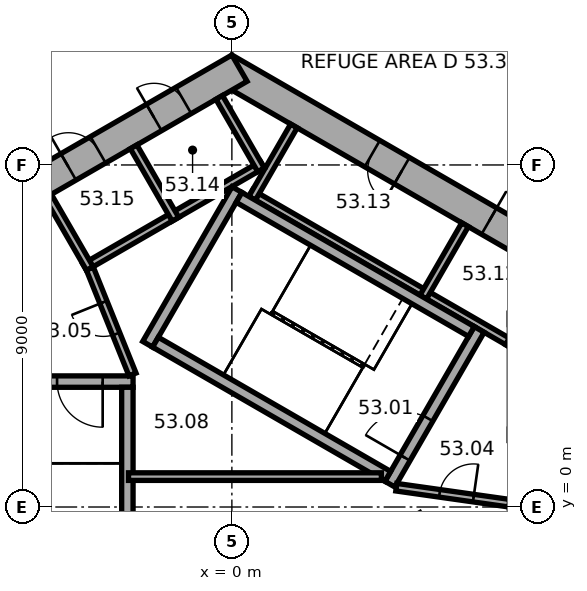
"""IFC4 building model, lengths in metres.
Left out: names, types, materials, properties, quantities, classifications, styles, units other than length and angle.
Written with IfcOpenShell. Run it as: python <this file> out.ifc"""

import sys

from ifc_helpers import new_model, si_unit, direction, frame, frame_2d, origin, place, context, subcontext, project, spatial, rectangle, extrude, element, fill, save


model = new_model("IFC4")
c1 = context("Model", 3, precision=1e-05, world=origin(), true_north=direction((0.0, 1.0)))
c2 = subcontext(c1, "Body", "Model", "MODEL_VIEW")
j1 = project(units=[si_unit("LENGTHUNIT", "METRE"), si_unit("PLANEANGLEUNIT", "RADIAN")], contexts=[c1])
p1 = place(None, origin())
s1 = spatial("IfcSite", under=j1, at=p1, CompositionType="ELEMENT")
p2 = place(p1, origin())
s2 = spatial("IfcBuilding", under=s1, at=p2, CompositionType="ELEMENT")
p3 = place(p2, frame((0.0, 0.0, 214.3)))
s3 = spatial("IfcBuildingStorey", under=s2, at=p3, CompositionType="ELEMENT", Elevation=214.3)
p4 = place(p3, frame((10.1, 5.6, 0.0), z_axis=(0.0, 0.0, 1.0), x_axis=(-0.866023897231, 0.500002609418, 0.0)))
e1 = element("IfcWall", 1, at=p4, inside=s3, PredefinedType="SHEAR", context=c2, shape_type="SweptSolid", body=[
    extrude(rectangle(XDim=11.894, YDim=0.8, at=frame_2d((5.947, 0.0))), origin(), (0.0, 0.0, 1.0), 7.4),
])
p5 = place(p4, frame((2.947, 0.0, 0.0)))
e2 = element("IfcOpeningElement", 2, at=p5, cuts=e1, PredefinedType="OPENING", context=c2, shape_type="SweptSolid", body=[
    extrude(rectangle(XDim=0.9, YDim=2.1, at=frame_2d((0.45, 1.05))), frame((0.0, 0.41, 0.0), z_axis=(0.0, -1.0, 0.0), x_axis=(1.0, 0.0, 0.0)), (0.0, 0.0, 1.0), 0.82),
])
p6 = place(p4, frame((6.497, 0.0, 0.0)))
e3 = element("IfcOpeningElement", 3, at=p6, cuts=e1, PredefinedType="OPENING", context=c2, shape_type="SweptSolid", body=[
    extrude(rectangle(XDim=0.9, YDim=2.1, at=frame_2d((0.45, 1.05))), frame((0.0, 0.41, 0.0), z_axis=(0.0, -1.0, 0.0), x_axis=(1.0, 0.0, 0.0)), (0.0, 0.0, 1.0), 0.82),
])
p7 = place(p3, frame((0.2, 11.547, 0.0), z_axis=(0.0, 0.0, 1.0), x_axis=(-0.866023897231, -0.500002609418, 0.0)))
e4 = element("IfcWall", 4, at=p7, inside=s3, PredefinedType="SHEAR", context=c2, shape_type="SweptSolid", body=[
    extrude(rectangle(XDim=11.894, YDim=0.8, at=frame_2d((5.947, 0.0))), origin(), (0.0, 0.0, 1.0), 7.4),
])
p8 = place(p7, frame((6.147, 0.0, 0.0)))
e5 = element("IfcOpeningElement", 5, at=p8, cuts=e4, PredefinedType="OPENING", context=c2, shape_type="SweptSolid", body=[
    extrude(rectangle(XDim=1.5, YDim=2.1, at=frame_2d((0.75, 1.05))), frame((0.0, 0.41, 0.0), z_axis=(0.0, -1.0, 0.0), x_axis=(1.0, 0.0, 0.0)), (0.0, 0.0, 1.0), 0.82),
])
p9 = place(p7, frame((1.697, 0.0, 0.0)))
e6 = element("IfcOpeningElement", 6, at=p9, cuts=e4, PredefinedType="OPENING", context=c2, shape_type="SweptSolid", body=[
    extrude(rectangle(XDim=0.9, YDim=2.1, at=frame_2d((0.45, 1.05))), frame((0.0, 0.41, 0.0), z_axis=(0.0, -1.0, 0.0), x_axis=(1.0, 0.0, 0.0)), (0.0, 0.0, 1.0), 0.82),
])
p10 = place(p7, frame((4.297, 0.0, 0.0)))
e7 = element("IfcOpeningElement", 7, at=p10, cuts=e4, PredefinedType="OPENING", context=c2, shape_type="SweptSolid", body=[
    extrude(rectangle(XDim=0.9, YDim=2.1, at=frame_2d((0.45, 1.05))), frame((0.0, 0.41, 0.0), z_axis=(0.0, -1.0, 0.0), x_axis=(1.0, 0.0, 0.0)), (0.0, 0.0, 1.0), 0.82),
])
p11 = place(p3, frame((7.424, 4.259, 0.0), z_axis=(0.0, 0.0, 1.0), x_axis=(-0.866026010844, 0.49999894854, 0.0)))
e8 = element("IfcWall", 8, at=p11, inside=s3, PredefinedType="PARTITIONING", context=c2, shape_type="SweptSolid", body=[
    extrude(rectangle(XDim=8.0, YDim=0.2, at=frame_2d((4.0, 0.0))), origin(), (0.0, 0.0, 1.0), 7.12),
])
for number, where, z_axis, x_axis in (
    (9, (7.287, 4.222, 0.0), (0.0, 0.0, 1.0), (0.5, 0.866, 0.0)),
    (10, (5.036, 5.522, 0.0), (0.0, 0.0, 1.0), (0.5, 0.866, 0.0)),
    (11, (0.532, 8.122, 0.0), (0.0, 0.0, 1.0), (0.5, 0.866, 0.0)),
):
    element("IfcWall", number, at=place(p3, frame(where, z_axis=z_axis, x_axis=x_axis)), inside=s3, PredefinedType="PARTITIONING", context=c2, shape_type="SweptSolid", body=[
        extrude(rectangle(XDim=2.2, YDim=0.2, at=frame_2d((1.1, 0.0))), origin(), (0.0, 0.0, 1.0), 7.12),
    ])
p12 = place(p3, frame((0.803, 9.009, 0.0), z_axis=(0.0, 0.0, 1.0), x_axis=(-0.866028230842, -0.499995103361, 0.0)))
e12 = element("IfcWall", 12, at=p12, inside=s3, PredefinedType="PARTITIONING", context=c2, shape_type="SweptSolid", body=[
    extrude(rectangle(XDim=5.4, YDim=0.2, at=frame_2d((2.7, 0.0))), origin(), (0.0, 0.0, 1.0), 7.12),
])
p13 = place(p3, frame((0.767, 8.872, 0.0), z_axis=(0.0, 0.0, 1.0), x_axis=(-0.499994660107, 0.866028486751, 0.0)))
e13 = element("IfcWall", 13, at=p13, inside=s3, PredefinedType="PARTITIONING", context=c2, shape_type="SweptSolid", body=[
    extrude(rectangle(XDim=2.2, YDim=0.2, at=frame_2d((1.1, 0.0))), origin(), (0.0, 0.0, 1.0), 7.12),
])
for number, where, z_axis, x_axis in (
    (14, (-1.485, 7.572, 0.0), (0.0, 0.0, 1.0), (-0.5, 0.866, 0.0)),
    (15, (-3.737, 6.272, 0.0), (0.0, 0.0, 1.0), (-0.5, 0.866, 0.0)),
):
    element("IfcWall", number, at=place(p3, frame(where, z_axis=z_axis, x_axis=x_axis)), inside=s3, PredefinedType="PARTITIONING", context=c2, shape_type="SweptSolid", body=[
        extrude(rectangle(XDim=2.2, YDim=0.2, at=frame_2d((1.1, 0.0))), origin(), (0.0, 0.0, 1.0), 7.12),
    ])
p14 = place(p3, frame((4.158, 0.602, 0.0), z_axis=(0.0, 0.0, 1.0), x_axis=(0.499977259774, 0.866038532462, 0.0)))
e16 = element("IfcWall", 16, at=p14, inside=s3, PredefinedType="SHEAR", context=c2, shape_type="SweptSolid", body=[
    extrude(rectangle(XDim=4.7, YDim=0.3, at=frame_2d((2.35, 0.0))), origin(), (0.0, 0.0, 1.0), 7.12),
])
p15 = place(p14, frame((0.8, 0.0, 0.0)))
e17 = element("IfcOpeningElement", 17, at=p15, cuts=e16, PredefinedType="OPENING", context=c2, shape_type="SweptSolid", body=[
    extrude(rectangle(XDim=1.2, YDim=2.1, at=frame_2d((0.6, 1.05))), frame((0.0, 0.16, 0.0), z_axis=(0.0, -1.0, 0.0), x_axis=(1.0, 0.0, 0.0)), (0.0, 0.0, 1.0), 0.32),
])
p16 = place(p3, frame((-2.216, 4.282, 0.0), z_axis=(0.0, 0.0, 1.0), x_axis=(0.499977259774, 0.866038532462, 0.0)))
e18 = element("IfcWall", 18, at=p16, inside=s3, PredefinedType="SHEAR", context=c2, shape_type="SweptSolid", body=[
    extrude(rectangle(XDim=4.7, YDim=0.3, at=frame_2d((2.35, 0.0))), origin(), (0.0, 0.0, 1.0), 7.12),
])
for number, where, z_axis, x_axis in (
    (19, (4.103, 0.807, 0.0), (0.0, 0.0, 1.0), (-0.866, 0.5, 0.0)),
    (20, (6.303, 4.617, 0.0), (0.0, 0.0, 1.0), (-0.866, 0.5, 0.0)),
):
    element("IfcWall", number, at=place(p3, frame(where, z_axis=z_axis, x_axis=x_axis)), inside=s3, PredefinedType="SHEAR", context=c2, shape_type="SweptSolid", body=[
        extrude(rectangle(XDim=7.06, YDim=0.3, at=frame_2d((3.53, 0.0))), origin(), (0.0, 0.0, 1.0), 7.12),
    ])
p17 = place(p3, frame((-2.6, 3.3, 0.0), z_axis=(0.0, 0.0, 1.0), x_axis=(-1.0, 0.0, 0.0)))
e21 = element("IfcWall", 21, at=p17, inside=s3, PredefinedType="SHEAR", context=c2, shape_type="SweptSolid", body=[
    extrude(rectangle(XDim=4.7, YDim=0.3, at=frame_2d((2.35, 0.0))), origin(), (0.0, 0.0, 1.0), 7.12),
])
p18 = place(p17, frame((0.8, 0.0, 0.0)))
e22 = element("IfcOpeningElement", 22, at=p18, cuts=e21, PredefinedType="OPENING", context=c2, shape_type="SweptSolid", body=[
    extrude(rectangle(XDim=1.2, YDim=2.1, at=frame_2d((0.6, 1.05))), frame((0.0, 0.16, 0.0), z_axis=(0.0, -1.0, 0.0), x_axis=(1.0, 0.0, 0.0)), (0.0, 0.0, 1.0), 0.32),
])
p19 = place(p3, frame((-2.75, 3.15, 0.0), z_axis=(0.0, 0.0, 1.0), x_axis=(0.0, -1.0, 0.0)))
e23 = element("IfcWall", 23, at=p19, inside=s3, PredefinedType="SHEAR", context=c2, shape_type="SweptSolid", body=[
    extrude(rectangle(XDim=7.06, YDim=0.3, at=frame_2d((3.53, 0.0))), origin(), (0.0, 0.0, 1.0), 7.12),
])
p20 = place(p3, frame((4.327, 0.521, 0.0), z_axis=(0.0, 0.0, 1.0), x_axis=(0.990124376366, -0.14019172346, 0.0)))
e24 = element("IfcWall", 24, at=p20, inside=s3, PredefinedType="PARTITIONING", context=c2, shape_type="SweptSolid", body=[
    extrude(rectangle(XDim=3.002, YDim=0.2, at=frame_2d((1.501, 0.0))), origin(), (0.0, 0.0, 1.0), 7.12),
])
p21 = place(p20, frame((1.15, 0.0, 0.0)))
e25 = element("IfcOpeningElement", 25, at=p21, cuts=e24, PredefinedType="OPENING", context=c2, shape_type="SweptSolid", body=[
    extrude(rectangle(XDim=0.9, YDim=2.1, at=frame_2d((0.45, 1.05))), frame((0.0, 0.11, 0.0), z_axis=(0.0, -1.0, 0.0), x_axis=(1.0, 0.0, 0.0)), (0.0, 0.0, 1.0), 0.22),
])
p22 = place(p3, frame((-2.615, 3.487, 0.0), z_axis=(0.0, 0.0, 1.0), x_axis=(-0.373576831041, 0.92759924068, 0.0)))
e26 = element("IfcWall", 26, at=p22, inside=s3, PredefinedType="PARTITIONING", context=c2, shape_type="SweptSolid", body=[
    extrude(rectangle(XDim=3.002, YDim=0.2, at=frame_2d((1.501, 0.0))), origin(), (0.0, 0.0, 1.0), 7.12),
])
p23 = place(p22, frame((1.15, 0.0, 0.0)))
e27 = element("IfcOpeningElement", 27, at=p23, cuts=e26, PredefinedType="OPENING", context=c2, shape_type="SweptSolid", body=[
    extrude(rectangle(XDim=0.9, YDim=2.1, at=frame_2d((0.45, 1.05))), frame((0.0, 0.11, 0.0), z_axis=(0.0, -1.0, 0.0), x_axis=(1.0, 0.0, 0.0)), (0.0, 0.0, 1.0), 0.22),
])
p24 = place(p3, frame((-2.72, 0.8, 0.0), z_axis=(0.0, 0.0, 1.0), x_axis=(1.0, 0.0, 0.0)))
e28 = element("IfcWall", 28, at=p24, inside=s3, PredefinedType="PARTITIONING", context=c2, shape_type="SweptSolid", body=[
    extrude(rectangle(XDim=6.654, YDim=0.2, at=frame_2d((3.327, 0.0))), origin(), (0.0, 0.0, 1.0), 7.12),
])
p25 = place(p3, frame((-2.03, 14.186, 0.0), z_axis=(0.0, 0.0, 1.0), x_axis=(-0.866034287694, -0.499984612302, 0.0)))
e29 = element("IfcWall", 29, at=p25, inside=s3, PredefinedType="PARTITIONING", context=c2, shape_type="SweptSolid", body=[
    extrude(rectangle(XDim=7.067, YDim=0.15, at=frame_2d((3.534, 0.0))), origin(), (0.0, 0.0, 1.0), 7.12),
])
p26 = place(p25, frame((0.55, 0.0, 0.0)))
e30 = element("IfcOpeningElement", 30, at=p26, cuts=e29, PredefinedType="OPENING", context=c2, shape_type="SweptSolid", body=[
    extrude(rectangle(XDim=1.4, YDim=2.4, at=frame_2d((0.7, 1.2))), frame((0.0, 0.085, 0.0), z_axis=(0.0, -1.0, 0.0), x_axis=(1.0, 0.0, 0.0)), (0.0, 0.0, 1.0), 0.17),
])
p27 = place(p15, origin())
e31 = element("IfcDoor", 31, at=p27, inside=s3, OperationType="SINGLE_SWING_RIGHT", PredefinedType="DOOR", context=c2, shape_type="SweptSolid", body=[
    extrude(rectangle(XDim=1.2, YDim=2.1, at=frame_2d((0.6, 1.05))), frame((0.0, 0.025, 0.0), z_axis=(0.0, -1.0, 0.0), x_axis=(1.0, 0.0, 0.0)), (0.0, 0.0, 1.0), 0.05),
])
fill(e17, e31)
p28 = place(p18, origin())
e32 = element("IfcDoor", 32, at=p28, inside=s3, OperationType="SINGLE_SWING_RIGHT", PredefinedType="DOOR", context=c2, shape_type="SweptSolid", body=[
    extrude(rectangle(XDim=1.2, YDim=2.1, at=frame_2d((0.6, 1.05))), frame((0.0, 0.025, 0.0), z_axis=(0.0, -1.0, 0.0), x_axis=(1.0, 0.0, 0.0)), (0.0, 0.0, 1.0), 0.05),
])
fill(e22, e32)
p29 = place(p21, origin())
e33 = element("IfcDoor", 33, at=p29, inside=s3, OperationType="SINGLE_SWING_LEFT", PredefinedType="DOOR", context=c2, shape_type="SweptSolid", body=[
    extrude(rectangle(XDim=0.9, YDim=2.1, at=frame_2d((0.45, 1.05))), frame((0.0, 0.025, 0.0), z_axis=(0.0, -1.0, 0.0), x_axis=(1.0, 0.0, 0.0)), (0.0, 0.0, 1.0), 0.05),
])
fill(e25, e33)
p30 = place(p23, origin())
e34 = element("IfcDoor", 34, at=p30, inside=s3, OperationType="SINGLE_SWING_LEFT", PredefinedType="DOOR", context=c2, shape_type="SweptSolid", body=[
    extrude(rectangle(XDim=0.9, YDim=2.1, at=frame_2d((0.45, 1.05))), frame((0.0, 0.025, 0.0), z_axis=(0.0, -1.0, 0.0), x_axis=(1.0, 0.0, 0.0)), (0.0, 0.0, 1.0), 0.05),
])
fill(e27, e34)
p31 = place(p5, origin())
e35 = element("IfcDoor", 35, at=p31, inside=s3, OperationType="SINGLE_SWING_LEFT", PredefinedType="DOOR", context=c2, shape_type="SweptSolid", body=[
    extrude(rectangle(XDim=0.9, YDim=2.1, at=frame_2d((0.45, 1.05))), frame((0.0, 0.025, 0.0), z_axis=(0.0, -1.0, 0.0), x_axis=(1.0, 0.0, 0.0)), (0.0, 0.0, 1.0), 0.05),
])
fill(e2, e35)
p32 = place(p6, origin())
e36 = element("IfcDoor", 36, at=p32, inside=s3, OperationType="SINGLE_SWING_LEFT", PredefinedType="DOOR", context=c2, shape_type="SweptSolid", body=[
    extrude(rectangle(XDim=0.9, YDim=2.1, at=frame_2d((0.45, 1.05))), frame((0.0, 0.025, 0.0), z_axis=(0.0, -1.0, 0.0), x_axis=(1.0, 0.0, 0.0)), (0.0, 0.0, 1.0), 0.05),
])
fill(e3, e36)
p33 = place(p9, origin())
e37 = element("IfcDoor", 37, at=p33, inside=s3, OperationType="SINGLE_SWING_LEFT", PredefinedType="DOOR", context=c2, shape_type="SweptSolid", body=[
    extrude(rectangle(XDim=0.9, YDim=2.1, at=frame_2d((0.45, 1.05))), frame((0.0, 0.025, 0.0), z_axis=(0.0, -1.0, 0.0), x_axis=(1.0, 0.0, 0.0)), (0.0, 0.0, 1.0), 0.05),
])
fill(e6, e37)
p34 = place(p10, origin())
e38 = element("IfcDoor", 38, at=p34, inside=s3, OperationType="SINGLE_SWING_LEFT", PredefinedType="DOOR", context=c2, shape_type="SweptSolid", body=[
    extrude(rectangle(XDim=0.9, YDim=2.1, at=frame_2d((0.45, 1.05))), frame((0.0, 0.025, 0.0), z_axis=(0.0, -1.0, 0.0), x_axis=(1.0, 0.0, 0.0)), (0.0, 0.0, 1.0), 0.05),
])
fill(e7, e38)
save(model, sys.argv[1])
